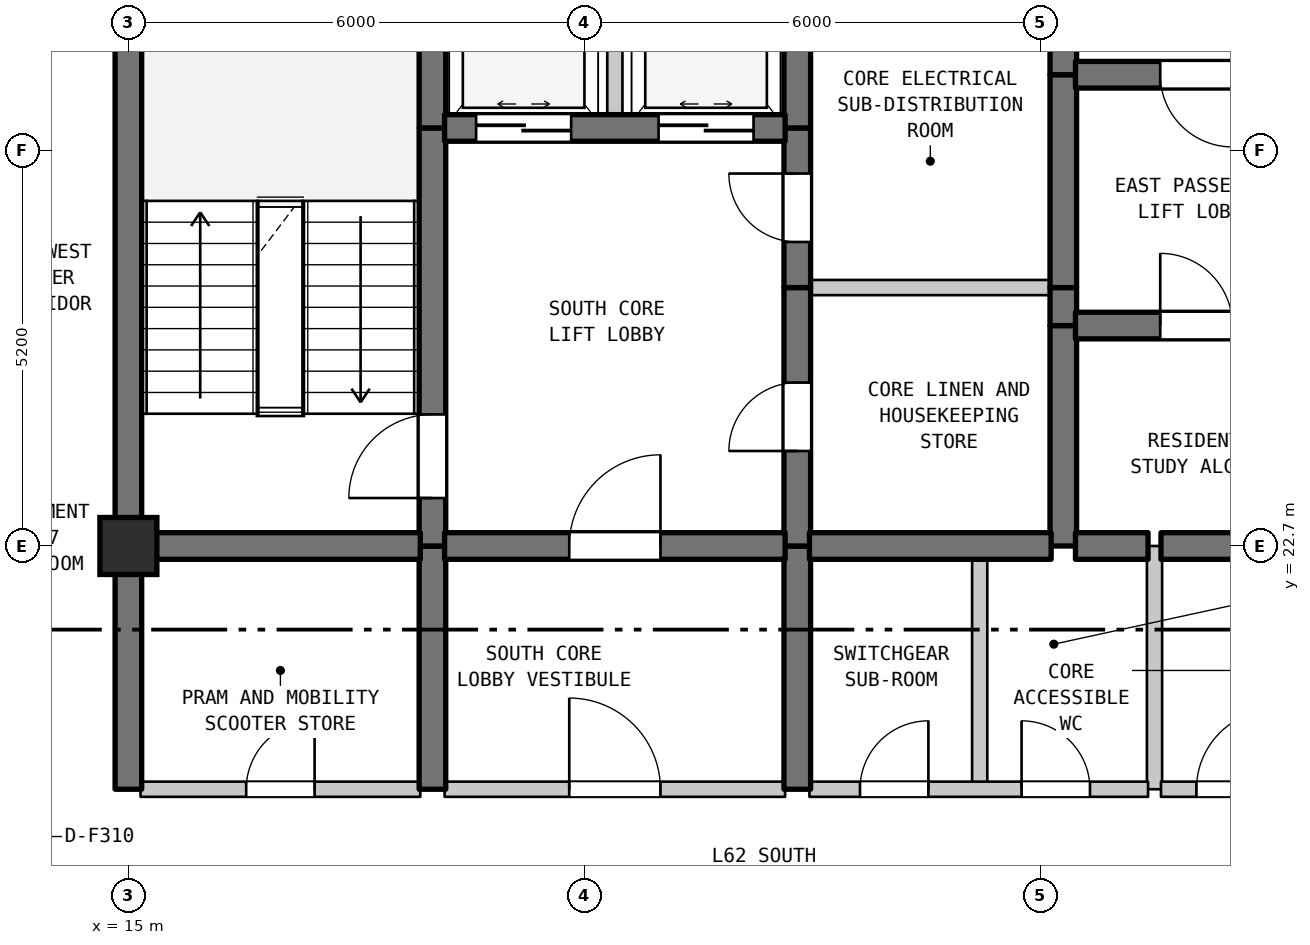
"""IFC4 building model, lengths in metres.
Left out: names, types, materials, properties, quantities, classifications, styles, units other than length and angle.
Written with IfcOpenShell. Run it as: python <this file> out.ifc"""

import sys

from ifc_helpers import new_model, si_unit, direction, frame, frame_2d, origin, origin_2d, place, context, subcontext, project, spatial, rectangle, extrude, element, fill, save


model = new_model("IFC4")
c1 = context("Model", 3, precision=1e-05, world=origin(), true_north=direction((0.0, 1.0)))
c2 = subcontext(c1, "Body", "Model", "MODEL_VIEW")
j1 = project(units=[si_unit("LENGTHUNIT", "METRE"), si_unit("PLANEANGLEUNIT", "RADIAN")], contexts=[c1])
p1 = place(None, origin())
s1 = spatial("IfcSite", under=j1, at=p1, CompositionType="ELEMENT")
p2 = place(p1, origin())
s2 = spatial("IfcBuilding", under=s1, at=p2, CompositionType="ELEMENT")
p3 = place(p2, frame((0.0, 0.0, 251.0)))
s3 = spatial("IfcBuildingStorey", under=s2, at=p3, CompositionType="ELEMENT", Elevation=251.0)
p4 = place(p3, frame((15.0, 22.7, 0.0), z_axis=(0.0, 0.0, 1.0), x_axis=(1.0, 0.0, 0.0)))
e1 = element("IfcColumn", 1, at=p4, inside=s3, PredefinedType="COLUMN", context=c2, shape_type="SweptSolid", body=[
    extrude(rectangle(XDim=0.75, YDim=0.75, at=origin_2d()), origin(), (0.0, 0.0, 1.0), 3.7),
])
p5 = place(p3, frame((15.0, 19.5, 0.0), z_axis=(0.0, 0.0, 1.0), x_axis=(0.0, 1.0, 0.0)))
e2 = element("IfcWall", 2, at=p5, inside=s3, PredefinedType="SHEAR", context=c2, shape_type="SweptSolid", body=[
    extrude(rectangle(XDim=3.2, YDim=0.35, at=frame_2d((1.6, 0.0))), origin(), (0.0, 0.0, 1.0), 3.39),
])
p6 = place(p3, frame((15.0, 22.7, 0.0), z_axis=(0.0, 0.0, 1.0), x_axis=(0.0, 1.0, 0.0)))
e3 = element("IfcWall", 3, at=p6, inside=s3, PredefinedType="SHEAR", context=c2, shape_type="SweptSolid", body=[
    extrude(rectangle(XDim=6.8, YDim=0.35, at=frame_2d((3.4, 0.0))), origin(), (0.0, 0.0, 1.0), 3.39),
])
p7 = place(p3, frame((19.0, 19.5, 0.0), z_axis=(0.0, 0.0, 1.0), x_axis=(0.0, 1.0, 0.0)))
e4 = element("IfcWall", 4, at=p7, inside=s3, PredefinedType="SHEAR", context=c2, shape_type="SweptSolid", body=[
    extrude(rectangle(XDim=3.2, YDim=0.35, at=frame_2d((1.6, 0.0))), origin(), (0.0, 0.0, 1.0), 3.39),
])
p8 = place(p3, frame((19.0, 22.7, 0.0), z_axis=(0.0, 0.0, 1.0), x_axis=(0.0, 1.0, 0.0)))
e5 = element("IfcWall", 5, at=p8, inside=s3, PredefinedType="SHEAR", context=c2, shape_type="SweptSolid", body=[
    extrude(rectangle(XDim=5.5, YDim=0.35, at=frame_2d((2.75, 0.0))), origin(), (0.0, 0.0, 1.0), 3.39),
])
p9 = place(p8, frame((0.631, 0.0, 0.0)))
e6 = element("IfcOpeningElement", 6, at=p9, cuts=e5, PredefinedType="OPENING", context=c2, shape_type="SweptSolid", body=[
    extrude(rectangle(XDim=1.1, YDim=2.15, at=frame_2d((0.55, 1.075))), frame((0.0, 0.185, 0.0), z_axis=(0.0, -1.0, 0.0), x_axis=(1.0, 0.0, 0.0)), (0.0, 0.0, 1.0), 0.37),
])
p10 = place(p3, frame((19.0, 28.2, 0.0), z_axis=(0.0, 0.0, 1.0), x_axis=(0.0, 1.0, 0.0)))
e7 = element("IfcWall", 7, at=p10, inside=s3, PredefinedType="SHEAR", context=c2, shape_type="SweptSolid", body=[
    extrude(rectangle(XDim=1.3, YDim=0.35, at=frame_2d((0.65, 0.0))), origin(), (0.0, 0.0, 1.0), 3.39),
])
p11 = place(p3, frame((21.4, 28.2, 0.0), z_axis=(0.0, 0.0, 1.0), x_axis=(0.0, 1.0, 0.0)))
e8 = element("IfcWall", 8, at=p11, inside=s3, PredefinedType="STANDARD", context=c2, shape_type="SweptSolid", body=[
    extrude(rectangle(XDim=2.6, YDim=0.2, at=frame_2d((1.3, 0.0))), origin(), (0.0, 0.0, 1.0), 3.39),
])
p12 = place(p3, frame((23.8, 19.5, 0.0), z_axis=(0.0, 0.0, 1.0), x_axis=(0.0, 1.0, 0.0)))
e9 = element("IfcWall", 9, at=p12, inside=s3, PredefinedType="SHEAR", context=c2, shape_type="SweptSolid", body=[
    extrude(rectangle(XDim=3.2, YDim=0.35, at=frame_2d((1.6, 0.0))), origin(), (0.0, 0.0, 1.0), 3.39),
])
p13 = place(p3, frame((23.8, 22.7, 0.0), z_axis=(0.0, 0.0, 1.0), x_axis=(0.0, 1.0, 0.0)))
e10 = element("IfcWall", 10, at=p13, inside=s3, PredefinedType="SHEAR", context=c2, shape_type="SweptSolid", body=[
    extrude(rectangle(XDim=3.4, YDim=0.35, at=frame_2d((1.7, 0.0))), origin(), (0.0, 0.0, 1.0), 3.39),
])
p14 = place(p13, frame((1.25, 0.0, 0.0)))
e11 = element("IfcOpeningElement", 11, at=p14, cuts=e10, PredefinedType="OPENING", context=c2, shape_type="SweptSolid", body=[
    extrude(rectangle(XDim=0.9, YDim=2.15, at=frame_2d((0.45, 1.075))), frame((0.0, 0.185, 0.0), z_axis=(0.0, -1.0, 0.0), x_axis=(1.0, 0.0, 0.0)), (0.0, 0.0, 1.0), 0.37),
])
p15 = place(p3, frame((23.8, 26.1, 0.0), z_axis=(0.0, 0.0, 1.0), x_axis=(0.0, 1.0, 0.0)))
e12 = element("IfcWall", 12, at=p15, inside=s3, PredefinedType="SHEAR", context=c2, shape_type="SweptSolid", body=[
    extrude(rectangle(XDim=2.1, YDim=0.35, at=frame_2d((1.05, 0.0))), origin(), (0.0, 0.0, 1.0), 3.39),
])
p16 = place(p15, frame((0.6, 0.0, 0.0)))
e13 = element("IfcOpeningElement", 13, at=p16, cuts=e12, PredefinedType="OPENING", context=c2, shape_type="SweptSolid", body=[
    extrude(rectangle(XDim=0.9, YDim=2.15, at=frame_2d((0.45, 1.075))), frame((0.0, 0.185, 0.0), z_axis=(0.0, -1.0, 0.0), x_axis=(1.0, 0.0, 0.0)), (0.0, 0.0, 1.0), 0.37),
])
p17 = place(p3, frame((23.8, 28.2, 0.0), z_axis=(0.0, 0.0, 1.0), x_axis=(0.0, 1.0, 0.0)))
e14 = element("IfcWall", 14, at=p17, inside=s3, PredefinedType="SHEAR", context=c2, shape_type="SweptSolid", body=[
    extrude(rectangle(XDim=2.6, YDim=0.35, at=frame_2d((1.3, 0.0))), origin(), (0.0, 0.0, 1.0), 3.39),
])
p18 = place(p3, frame((26.2, 19.5, 0.0), z_axis=(0.0, 0.0, 1.0), x_axis=(0.0, 1.0, 0.0)))
e15 = element("IfcWall", 15, at=p18, inside=s3, PredefinedType="STANDARD", context=c2, shape_type="SweptSolid", body=[
    extrude(rectangle(XDim=3.2, YDim=0.2, at=frame_2d((1.6, 0.0))), origin(), (0.0, 0.0, 1.0), 3.39),
])
p19 = place(p3, frame((27.3, 22.7, 0.0), z_axis=(0.0, 0.0, 1.0), x_axis=(0.0, 1.0, 0.0)))
e16 = element("IfcWall", 16, at=p19, inside=s3, PredefinedType="SHEAR", context=c2, shape_type="SweptSolid", body=[
    extrude(rectangle(XDim=2.9, YDim=0.35, at=frame_2d((1.45, 0.0))), origin(), (0.0, 0.0, 1.0), 3.39),
])
p20 = place(p3, frame((27.3, 25.6, 0.0), z_axis=(0.0, 0.0, 1.0), x_axis=(0.0, 1.0, 0.0)))
e17 = element("IfcWall", 17, at=p20, inside=s3, PredefinedType="SHEAR", context=c2, shape_type="SweptSolid", body=[
    extrude(rectangle(XDim=0.5, YDim=0.35, at=frame_2d((0.25, 0.0))), origin(), (0.0, 0.0, 1.0), 3.39),
])
p21 = place(p3, frame((27.3, 26.1, 0.0), z_axis=(0.0, 0.0, 1.0), x_axis=(0.0, 1.0, 0.0)))
e18 = element("IfcWall", 18, at=p21, inside=s3, PredefinedType="SHEAR", context=c2, shape_type="SweptSolid", body=[
    extrude(rectangle(XDim=2.8, YDim=0.35, at=frame_2d((1.4, 0.0))), origin(), (0.0, 0.0, 1.0), 3.39),
])
p22 = place(p3, frame((27.3, 28.9, 0.0), z_axis=(0.0, 0.0, 1.0), x_axis=(0.0, 1.0, 0.0)))
e19 = element("IfcWall", 19, at=p22, inside=s3, PredefinedType="SHEAR", context=c2, shape_type="SweptSolid", body=[
    extrude(rectangle(XDim=2.6, YDim=0.35, at=frame_2d((1.3, 0.0))), origin(), (0.0, 0.0, 1.0), 3.39),
])
p23 = place(p3, frame((28.5, 19.5, 0.0), z_axis=(0.0, 0.0, 1.0), x_axis=(0.0, 1.0, 0.0)))
e20 = element("IfcWall", 20, at=p23, inside=s3, PredefinedType="STANDARD", context=c2, shape_type="SweptSolid", body=[
    extrude(rectangle(XDim=3.2, YDim=0.2, at=frame_2d((1.6, 0.0))), origin(), (0.0, 0.0, 1.0), 3.39),
])
p24 = place(p3, frame((15.16, 19.5, 0.0), z_axis=(0.0, 0.0, 1.0), x_axis=(1.0, 0.0, 0.0)))
e21 = element("IfcWall", 21, at=p24, inside=s3, PredefinedType="STANDARD", context=c2, shape_type="SweptSolid", body=[
    extrude(rectangle(XDim=3.68, YDim=0.2, at=frame_2d((1.84, 0.0))), origin(), (0.0, 0.0, 1.0), 3.39),
])
p25 = place(p24, frame((1.39, 0.0, 0.0)))
e22 = element("IfcOpeningElement", 22, at=p25, cuts=e21, PredefinedType="OPENING", context=c2, shape_type="SweptSolid", body=[
    extrude(rectangle(XDim=0.9, YDim=2.15, at=frame_2d((0.45, 1.075))), frame((0.0, 0.11, 0.0), z_axis=(0.0, -1.0, 0.0), x_axis=(1.0, 0.0, 0.0)), (0.0, 0.0, 1.0), 0.22),
])
p26 = place(p3, frame((19.16, 19.5, 0.0), z_axis=(0.0, 0.0, 1.0), x_axis=(1.0, 0.0, 0.0)))
e23 = element("IfcWall", 23, at=p26, inside=s3, PredefinedType="STANDARD", context=c2, shape_type="SweptSolid", body=[
    extrude(rectangle(XDim=4.48, YDim=0.2, at=frame_2d((2.24, 0.0))), origin(), (0.0, 0.0, 1.0), 3.39),
])
p27 = place(p26, frame((1.64, 0.0, 0.0)))
e24 = element("IfcOpeningElement", 24, at=p27, cuts=e23, PredefinedType="OPENING", context=c2, shape_type="SweptSolid", body=[
    extrude(rectangle(XDim=1.2, YDim=2.2, at=frame_2d((0.6, 1.1))), frame((0.0, 0.11, 0.0), z_axis=(0.0, -1.0, 0.0), x_axis=(1.0, 0.0, 0.0)), (0.0, 0.0, 1.0), 0.22),
])
p28 = place(p3, frame((23.96, 19.5, 0.0), z_axis=(0.0, 0.0, 1.0), x_axis=(1.0, 0.0, 0.0)))
e25 = element("IfcWall", 25, at=p28, inside=s3, PredefinedType="STANDARD", context=c2, shape_type="SweptSolid", body=[
    extrude(rectangle(XDim=4.455, YDim=0.2, at=frame_2d((2.228, 0.0))), origin(), (0.0, 0.0, 1.0), 3.39),
])
p29 = place(p28, frame((0.665, 0.0, 0.0)))
e26 = element("IfcOpeningElement", 26, at=p29, cuts=e25, PredefinedType="OPENING", context=c2, shape_type="SweptSolid", body=[
    extrude(rectangle(XDim=0.9, YDim=2.15, at=frame_2d((0.45, 1.075))), frame((0.0, 0.11, 0.0), z_axis=(0.0, -1.0, 0.0), x_axis=(1.0, 0.0, 0.0)), (0.0, 0.0, 1.0), 0.22),
])
p30 = place(p28, frame((2.791, 0.0, 0.0)))
e27 = element("IfcOpeningElement", 27, at=p30, cuts=e25, PredefinedType="OPENING", context=c2, shape_type="SweptSolid", body=[
    extrude(rectangle(XDim=0.9, YDim=2.15, at=frame_2d((0.45, 1.075))), frame((0.0, 0.11, 0.0), z_axis=(0.0, -1.0, 0.0), x_axis=(1.0, 0.0, 0.0)), (0.0, 0.0, 1.0), 0.22),
])
p31 = place(p3, frame((28.585, 19.5, 0.0), z_axis=(0.0, 0.0, 1.0), x_axis=(1.0, 0.0, 0.0)))
e28 = element("IfcWall", 28, at=p31, inside=s3, PredefinedType="STANDARD", context=c2, shape_type="SweptSolid", body=[
    extrude(rectangle(XDim=2.055, YDim=0.2, at=frame_2d((1.027, 0.0))), origin(), (0.0, 0.0, 1.0), 3.39),
])
p32 = place(p31, frame((0.466, 0.0, 0.0)))
e29 = element("IfcOpeningElement", 29, at=p32, cuts=e28, PredefinedType="OPENING", context=c2, shape_type="SweptSolid", body=[
    extrude(rectangle(XDim=1.05, YDim=2.15, at=frame_2d((0.525, 1.075))), frame((0.0, 0.11, 0.0), z_axis=(0.0, -1.0, 0.0), x_axis=(1.0, 0.0, 0.0)), (0.0, 0.0, 1.0), 0.22),
])
p33 = place(p3, frame((15.16, 22.7, 0.0), z_axis=(0.0, 0.0, 1.0), x_axis=(1.0, 0.0, 0.0)))
e30 = element("IfcWall", 30, at=p33, inside=s3, PredefinedType="SHEAR", context=c2, shape_type="SweptSolid", body=[
    extrude(rectangle(XDim=3.68, YDim=0.35, at=frame_2d((1.84, 0.0))), origin(), (0.0, 0.0, 1.0), 3.39),
])
p34 = place(p3, frame((19.16, 22.7, 0.0), z_axis=(0.0, 0.0, 1.0), x_axis=(1.0, 0.0, 0.0)))
e31 = element("IfcWall", 31, at=p34, inside=s3, PredefinedType="SHEAR", context=c2, shape_type="SweptSolid", body=[
    extrude(rectangle(XDim=4.48, YDim=0.35, at=frame_2d((2.24, 0.0))), origin(), (0.0, 0.0, 1.0), 3.39),
])
p35 = place(p34, frame((1.64, 0.0, 0.0)))
e32 = element("IfcOpeningElement", 32, at=p35, cuts=e31, PredefinedType="OPENING", context=c2, shape_type="SweptSolid", body=[
    extrude(rectangle(XDim=1.2, YDim=2.2, at=frame_2d((0.6, 1.1))), frame((0.0, 0.185, 0.0), z_axis=(0.0, -1.0, 0.0), x_axis=(1.0, 0.0, 0.0)), (0.0, 0.0, 1.0), 0.37),
])
p36 = place(p3, frame((23.96, 22.7, 0.0), z_axis=(0.0, 0.0, 1.0), x_axis=(1.0, 0.0, 0.0)))
e33 = element("IfcWall", 33, at=p36, inside=s3, PredefinedType="SHEAR", context=c2, shape_type="SweptSolid", body=[
    extrude(rectangle(XDim=3.18, YDim=0.35, at=frame_2d((1.59, 0.0))), origin(), (0.0, 0.0, 1.0), 3.39),
])
p37 = place(p3, frame((27.46, 22.7, 0.0), z_axis=(0.0, 0.0, 1.0), x_axis=(1.0, 0.0, 0.0)))
e34 = element("IfcWall", 34, at=p37, inside=s3, PredefinedType="SHEAR", context=c2, shape_type="SweptSolid", body=[
    extrude(rectangle(XDim=0.955, YDim=0.35, at=frame_2d((0.478, 0.0))), origin(), (0.0, 0.0, 1.0), 3.39),
])
p38 = place(p3, frame((28.585, 22.7, 0.0), z_axis=(0.0, 0.0, 1.0), x_axis=(1.0, 0.0, 0.0)))
e35 = element("IfcWall", 35, at=p38, inside=s3, PredefinedType="SHEAR", context=c2, shape_type="SweptSolid", body=[
    extrude(rectangle(XDim=2.055, YDim=0.35, at=frame_2d((1.027, 0.0))), origin(), (0.0, 0.0, 1.0), 3.39),
])
p39 = place(p3, frame((27.46, 25.6, 0.0), z_axis=(0.0, 0.0, 1.0), x_axis=(1.0, 0.0, 0.0)))
e36 = element("IfcWall", 36, at=p39, inside=s3, PredefinedType="SHEAR", context=c2, shape_type="SweptSolid", body=[
    extrude(rectangle(XDim=3.18, YDim=0.35, at=frame_2d((1.59, 0.0))), origin(), (0.0, 0.0, 1.0), 3.39),
])
p40 = place(p39, frame((1.115, 0.0, 0.0)))
e37 = element("IfcOpeningElement", 37, at=p40, cuts=e36, PredefinedType="OPENING", context=c2, shape_type="SweptSolid", body=[
    extrude(rectangle(XDim=0.95, YDim=2.15, at=frame_2d((0.475, 1.075))), frame((0.0, 0.185, 0.0), z_axis=(0.0, -1.0, 0.0), x_axis=(1.0, 0.0, 0.0)), (0.0, 0.0, 1.0), 0.37),
])
p41 = place(p3, frame((23.96, 26.1, 0.0), z_axis=(0.0, 0.0, 1.0), x_axis=(1.0, 0.0, 0.0)))
e38 = element("IfcWall", 38, at=p41, inside=s3, PredefinedType="STANDARD", context=c2, shape_type="SweptSolid", body=[
    extrude(rectangle(XDim=3.18, YDim=0.2, at=frame_2d((1.59, 0.0))), origin(), (0.0, 0.0, 1.0), 3.39),
])
p42 = place(p3, frame((19.16, 28.2, 0.0), z_axis=(0.0, 0.0, 1.0), x_axis=(1.0, 0.0, 0.0)))
e39 = element("IfcWall", 39, at=p42, inside=s3, PredefinedType="SHEAR", context=c2, shape_type="SweptSolid", body=[
    extrude(rectangle(XDim=4.48, YDim=0.35, at=frame_2d((2.24, 0.0))), origin(), (0.0, 0.0, 1.0), 3.39),
])
p43 = place(p42, frame((0.415, 0.0, 0.0)))
e40 = element("IfcOpeningElement", 40, at=p43, cuts=e39, PredefinedType="OPENING", context=c2, shape_type="SweptSolid", body=[
    extrude(rectangle(XDim=1.25, YDim=2.2, at=frame_2d((0.625, 1.1))), frame((0.0, 0.185, 0.0), z_axis=(0.0, -1.0, 0.0), x_axis=(1.0, 0.0, 0.0)), (0.0, 0.0, 1.0), 0.37),
])
p44 = place(p42, frame((2.815, 0.0, 0.0)))
e41 = element("IfcOpeningElement", 41, at=p44, cuts=e39, PredefinedType="OPENING", context=c2, shape_type="SweptSolid", body=[
    extrude(rectangle(XDim=1.25, YDim=2.2, at=frame_2d((0.625, 1.1))), frame((0.0, 0.185, 0.0), z_axis=(0.0, -1.0, 0.0), x_axis=(1.0, 0.0, 0.0)), (0.0, 0.0, 1.0), 0.37),
])
p45 = place(p3, frame((27.46, 28.9, 0.0), z_axis=(0.0, 0.0, 1.0), x_axis=(1.0, 0.0, 0.0)))
e42 = element("IfcWall", 42, at=p45, inside=s3, PredefinedType="SHEAR", context=c2, shape_type="SweptSolid", body=[
    extrude(rectangle(XDim=3.18, YDim=0.35, at=frame_2d((1.59, 0.0))), origin(), (0.0, 0.0, 1.0), 3.39),
])
p46 = place(p45, frame((1.115, 0.0, 0.0)))
e43 = element("IfcOpeningElement", 43, at=p46, cuts=e42, PredefinedType="OPENING", context=c2, shape_type="SweptSolid", body=[
    extrude(rectangle(XDim=0.95, YDim=2.15, at=frame_2d((0.475, 1.075))), frame((0.0, 0.185, 0.0), z_axis=(0.0, -1.0, 0.0), x_axis=(1.0, 0.0, 0.0)), (0.0, 0.0, 1.0), 0.37),
])
p47 = place(p9, origin())
e44 = element("IfcDoor", 44, at=p47, inside=s3, OperationType="SINGLE_SWING_LEFT", PredefinedType="DOOR", context=c2, shape_type="SweptSolid", body=[
    extrude(rectangle(XDim=1.1, YDim=2.15, at=frame_2d((0.55, 1.075))), frame((0.0, 0.025, 0.0), z_axis=(0.0, -1.0, 0.0), x_axis=(1.0, 0.0, 0.0)), (0.0, 0.0, 1.0), 0.05),
])
fill(e6, e44)
p48 = place(p14, origin())
e45 = element("IfcDoor", 45, at=p48, inside=s3, OperationType="SINGLE_SWING_LEFT", PredefinedType="DOOR", context=c2, shape_type="SweptSolid", body=[
    extrude(rectangle(XDim=0.9, YDim=2.15, at=frame_2d((0.45, 1.075))), frame((0.0, 0.025, 0.0), z_axis=(0.0, -1.0, 0.0), x_axis=(1.0, 0.0, 0.0)), (0.0, 0.0, 1.0), 0.05),
])
fill(e11, e45)
p49 = place(p16, origin())
e46 = element("IfcDoor", 46, at=p49, inside=s3, OperationType="SINGLE_SWING_RIGHT", PredefinedType="DOOR", context=c2, shape_type="SweptSolid", body=[
    extrude(rectangle(XDim=0.9, YDim=2.15, at=frame_2d((0.45, 1.075))), frame((0.0, 0.025, 0.0), z_axis=(0.0, -1.0, 0.0), x_axis=(1.0, 0.0, 0.0)), (0.0, 0.0, 1.0), 0.05),
])
fill(e13, e46)
p50 = place(p25, origin())
e47 = element("IfcDoor", 47, at=p50, inside=s3, OperationType="SINGLE_SWING_RIGHT", PredefinedType="DOOR", context=c2, shape_type="SweptSolid", body=[
    extrude(rectangle(XDim=0.9, YDim=2.15, at=frame_2d((0.45, 1.075))), frame((0.0, 0.025, 0.0), z_axis=(0.0, -1.0, 0.0), x_axis=(1.0, 0.0, 0.0)), (0.0, 0.0, 1.0), 0.05),
])
fill(e22, e47)
p51 = place(p27, origin())
e48 = element("IfcDoor", 48, at=p51, inside=s3, OperationType="SINGLE_SWING_LEFT", PredefinedType="DOOR", context=c2, shape_type="SweptSolid", body=[
    extrude(rectangle(XDim=1.2, YDim=2.2, at=frame_2d((0.6, 1.1))), frame((0.0, 0.025, 0.0), z_axis=(0.0, -1.0, 0.0), x_axis=(1.0, 0.0, 0.0)), (0.0, 0.0, 1.0), 0.05),
])
fill(e24, e48)
p52 = place(p29, origin())
e49 = element("IfcDoor", 49, at=p52, inside=s3, OperationType="SINGLE_SWING_RIGHT", PredefinedType="DOOR", context=c2, shape_type="SweptSolid", body=[
    extrude(rectangle(XDim=0.9, YDim=2.15, at=frame_2d((0.45, 1.075))), frame((0.0, 0.025, 0.0), z_axis=(0.0, -1.0, 0.0), x_axis=(1.0, 0.0, 0.0)), (0.0, 0.0, 1.0), 0.05),
])
fill(e26, e49)
p53 = place(p30, origin())
e50 = element("IfcDoor", 50, at=p53, inside=s3, OperationType="SINGLE_SWING_LEFT", PredefinedType="DOOR", context=c2, shape_type="SweptSolid", body=[
    extrude(rectangle(XDim=0.9, YDim=2.15, at=frame_2d((0.45, 1.075))), frame((0.0, 0.025, 0.0), z_axis=(0.0, -1.0, 0.0), x_axis=(1.0, 0.0, 0.0)), (0.0, 0.0, 1.0), 0.05),
])
fill(e27, e50)
p54 = place(p32, origin())
e51 = element("IfcDoor", 51, at=p54, inside=s3, OperationType="SINGLE_SWING_RIGHT", PredefinedType="DOOR", context=c2, shape_type="SweptSolid", body=[
    extrude(rectangle(XDim=1.05, YDim=2.15, at=frame_2d((0.525, 1.075))), frame((0.0, 0.025, 0.0), z_axis=(0.0, -1.0, 0.0), x_axis=(1.0, 0.0, 0.0)), (0.0, 0.0, 1.0), 0.05),
])
fill(e29, e51)
p55 = place(p35, origin())
e52 = element("IfcDoor", 52, at=p55, inside=s3, OperationType="SINGLE_SWING_RIGHT", PredefinedType="DOOR", context=c2, shape_type="SweptSolid", body=[
    extrude(rectangle(XDim=1.2, YDim=2.2, at=frame_2d((0.6, 1.1))), frame((0.0, 0.025, 0.0), z_axis=(0.0, -1.0, 0.0), x_axis=(1.0, 0.0, 0.0)), (0.0, 0.0, 1.0), 0.05),
])
fill(e32, e52)
p56 = place(p40, origin())
e53 = element("IfcDoor", 53, at=p56, inside=s3, OperationType="SINGLE_SWING_LEFT", PredefinedType="DOOR", context=c2, shape_type="SweptSolid", body=[
    extrude(rectangle(XDim=0.95, YDim=2.15, at=frame_2d((0.475, 1.075))), frame((0.0, 0.025, 0.0), z_axis=(0.0, -1.0, 0.0), x_axis=(1.0, 0.0, 0.0)), (0.0, 0.0, 1.0), 0.05),
])
fill(e37, e53)
p57 = place(p43, origin())
e54 = element("IfcDoor", 54, at=p57, inside=s3, OperationType="DOUBLE_DOOR_SLIDING", PredefinedType="DOOR", context=c2, shape_type="SweptSolid", body=[
    extrude(rectangle(XDim=1.25, YDim=2.2, at=frame_2d((0.625, 1.1))), frame((0.0, 0.025, 0.0), z_axis=(0.0, -1.0, 0.0), x_axis=(1.0, 0.0, 0.0)), (0.0, 0.0, 1.0), 0.05),
])
fill(e40, e54)
p58 = place(p44, origin())
e55 = element("IfcDoor", 55, at=p58, inside=s3, OperationType="DOUBLE_DOOR_SLIDING", PredefinedType="DOOR", context=c2, shape_type="SweptSolid", body=[
    extrude(rectangle(XDim=1.25, YDim=2.2, at=frame_2d((0.625, 1.1))), frame((0.0, 0.025, 0.0), z_axis=(0.0, -1.0, 0.0), x_axis=(1.0, 0.0, 0.0)), (0.0, 0.0, 1.0), 0.05),
])
fill(e41, e55)
p59 = place(p46, frame((0.95, 0.0, 0.0), z_axis=(0.0, 0.0, 1.0), x_axis=(-1.0, 0.0, 0.0)))
e56 = element("IfcDoor", 56, at=p59, inside=s3, OperationType="SINGLE_SWING_RIGHT", PredefinedType="DOOR", context=c2, shape_type="SweptSolid", body=[
    extrude(rectangle(XDim=0.95, YDim=2.15, at=frame_2d((0.475, 1.075))), frame((0.0, 0.025, 0.0), z_axis=(0.0, -1.0, 0.0), x_axis=(1.0, 0.0, 0.0)), (0.0, 0.0, 1.0), 0.05),
])
fill(e43, e56)
save(model, sys.argv[1])
